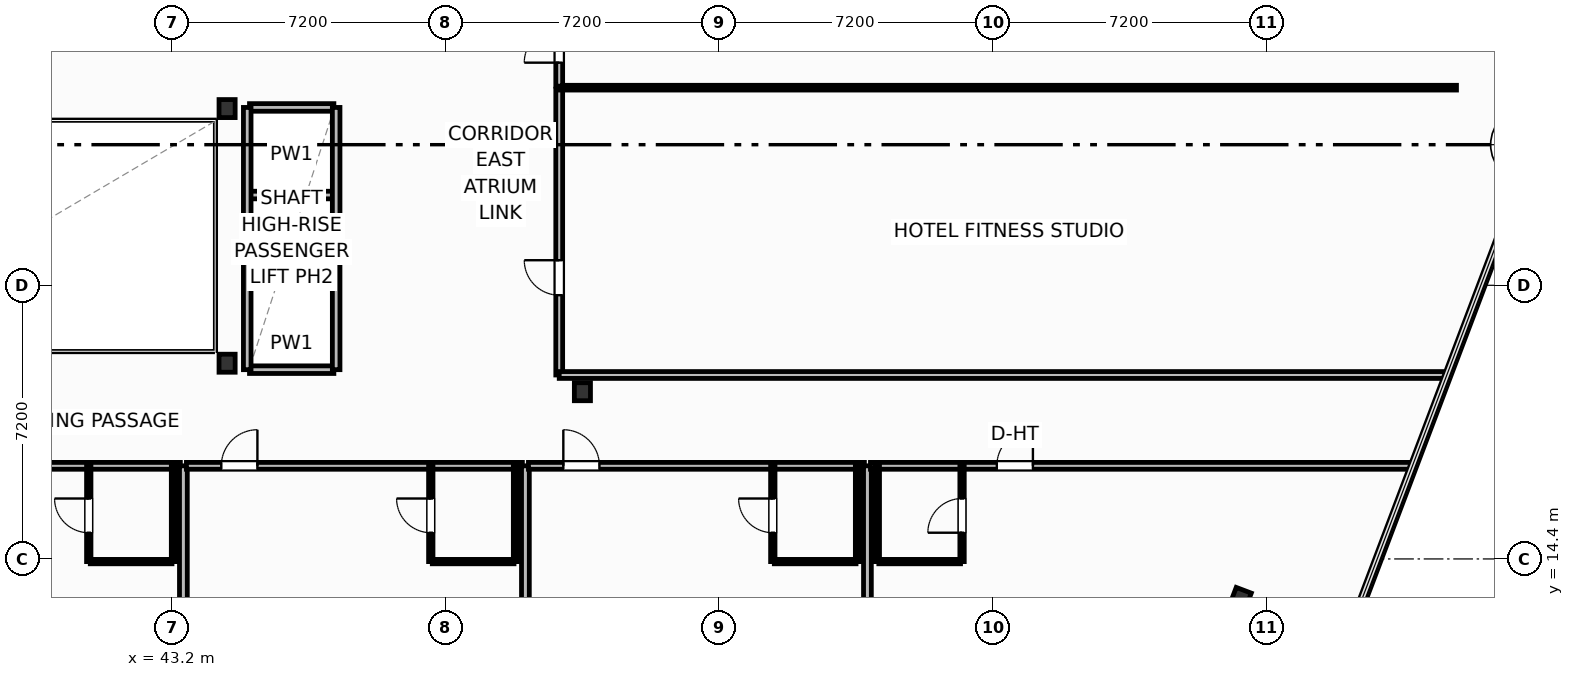
"""IFC4 building model, lengths in metres.
Left out: names, types, materials, properties, quantities, classifications, styles, units other than length and angle.
Written with IfcOpenShell. Run it as: python <this file> out.ifc"""

import sys

from ifc_helpers import new_model, si_unit, direction, frame, frame_2d, origin, origin_2d, place, context, subcontext, project, spatial, rectangle, i_section, extrude, element, fill, save


model = new_model("IFC4")
c1 = context("Model", 3, precision=1e-05, world=origin(), true_north=direction((0.0, 1.0)))
c2 = subcontext(c1, "Body", "Model", "MODEL_VIEW")
j1 = project(units=[si_unit("LENGTHUNIT", "METRE"), si_unit("PLANEANGLEUNIT", "RADIAN")], contexts=[c1])
p1 = place(None, origin())
s1 = spatial("IfcSite", under=j1, at=p1, CompositionType="ELEMENT")
p2 = place(p1, origin())
s2 = spatial("IfcBuilding", under=s1, at=p2, CompositionType="ELEMENT")
p3 = place(p2, frame((0.0, 0.0, 76.2)))
s3 = spatial("IfcBuildingStorey", under=s2, at=p3, CompositionType="ELEMENT", Elevation=76.2)
for number, where, z_axis, x_axis in (
    (1, (44.65, 19.55, 0.0), (0.0, 0.0, 1.0), (1.0, 0.0, 0.0)),
    (2, (44.65, 26.25, 0.0), (0.0, 0.0, 1.0), (1.0, 0.0, 0.0)),
    (3, (54.0, 18.8, 0.0), (0.0, 0.0, 1.0), (1.0, 0.0, 0.0)),
    (4, (71.319, 13.354, 0.0), (0.0, 0.0, 1.0), (0.935, -0.354, 0.0)),
):
    element("IfcColumn", number, at=place(p3, frame(where, z_axis=z_axis, x_axis=x_axis)), inside=s3, PredefinedType="COLUMN", context=c2, shape_type="SweptSolid", body=[
        extrude(i_section(OverallWidth=0.424, OverallDepth=0.474, WebThickness=0.048, FlangeThickness=0.077, FilletRadius=0.025, at=origin_2d()), origin(), (0.0, 0.0, 1.0), 3.7),
    ])
p4 = place(p3, frame((34.58, 16.85, 0.0), z_axis=(0.0, 0.0, 1.0), x_axis=(1.0, 0.0, 0.0)))
e5 = element("IfcWall", 5, at=p4, inside=s3, PredefinedType="PARTITIONING", context=c2, shape_type="SweptSolid", body=[
    extrude(rectangle(XDim=8.84, YDim=0.18, at=frame_2d((4.42, 0.0))), origin(), (0.0, 0.0, 1.0), 3.45),
])
p5 = place(p4, frame((0.918, 0.0, 0.0)))
e6 = element("IfcOpeningElement", 6, at=p5, cuts=e5, PredefinedType="OPENING", context=c2, shape_type="SweptSolid", body=[
    extrude(rectangle(XDim=0.95, YDim=2.15, at=frame_2d((0.475, 1.075))), frame((0.0, 0.1, 0.0), z_axis=(0.0, -1.0, 0.0), x_axis=(1.0, 0.0, 0.0)), (0.0, 0.0, 1.0), 0.2),
])
p6 = place(p3, frame((41.05, 14.33, 0.0), z_axis=(0.0, 0.0, 1.0), x_axis=(1.0, 0.0, 0.0)))
e7 = element("IfcWall", 7, at=p6, inside=s3, PredefinedType="PARTITIONING", context=c2, shape_type="SweptSolid", body=[
    extrude(rectangle(XDim=2.15, YDim=0.115, at=frame_2d((1.075, 0.0))), origin(), (0.0, 0.0, 1.0), 3.45),
])
p7 = place(p3, frame((41.01, 14.33, 0.0), z_axis=(0.0, 0.0, 1.0), x_axis=(0.0, 1.0, 0.0)))
e8 = element("IfcWall", 8, at=p7, inside=s3, PredefinedType="PARTITIONING", context=c2, shape_type="SweptSolid", body=[
    extrude(rectangle(XDim=2.52, YDim=0.115, at=frame_2d((1.26, 0.0))), origin(), (0.0, 0.0, 1.0), 3.45),
])
p8 = place(p7, frame((0.76, 0.0, 0.0)))
e9 = element("IfcOpeningElement", 9, at=p8, cuts=e8, PredefinedType="OPENING", context=c2, shape_type="SweptSolid", body=[
    extrude(rectangle(XDim=0.9, YDim=2.05, at=frame_2d((0.45, 1.025))), frame((0.0, 0.067, 0.0), z_axis=(0.0, -1.0, 0.0), x_axis=(1.0, 0.0, 0.0)), (0.0, 0.0, 1.0), 0.135),
])
p9 = place(p3, frame((43.24, 14.33, 0.0), z_axis=(0.0, 0.0, 1.0), x_axis=(0.0, 1.0, 0.0)))
e10 = element("IfcWall", 10, at=p9, inside=s3, PredefinedType="PARTITIONING", context=c2, shape_type="SweptSolid", body=[
    extrude(rectangle(XDim=2.52, YDim=0.115, at=frame_2d((1.26, 0.0))), origin(), (0.0, 0.0, 1.0), 2.58),
])
p10 = place(p3, frame((43.5, 0.939, 0.0), z_axis=(0.0, 0.0, 1.0), x_axis=(0.0, 1.0, 0.0)))
e11 = element("IfcWall", 11, at=p10, inside=s3, PredefinedType="PARTITIONING", context=c2, shape_type="SweptSolid", body=[
    extrude(rectangle(XDim=15.911, YDim=0.205, at=frame_2d((7.955, 0.0))), origin(), (0.0, 0.0, 1.0), 2.58),
])
p11 = place(p3, frame((43.58, 16.85, 0.0), z_axis=(0.0, 0.0, 1.0), x_axis=(1.0, 0.0, 0.0)))
e12 = element("IfcWall", 12, at=p11, inside=s3, PredefinedType="PARTITIONING", context=c2, shape_type="SweptSolid", body=[
    extrude(rectangle(XDim=8.84, YDim=0.18, at=frame_2d((4.42, 0.0))), origin(), (0.0, 0.0, 1.0), 3.45),
])
p12 = place(p11, frame((0.918, 0.0, 0.0)))
e13 = element("IfcOpeningElement", 13, at=p12, cuts=e12, PredefinedType="OPENING", context=c2, shape_type="SweptSolid", body=[
    extrude(rectangle(XDim=0.95, YDim=2.15, at=frame_2d((0.475, 1.075))), frame((0.0, 0.1, 0.0), z_axis=(0.0, -1.0, 0.0), x_axis=(1.0, 0.0, 0.0)), (0.0, 0.0, 1.0), 0.2),
])
p13 = place(p3, frame((50.05, 14.33, 0.0), z_axis=(0.0, 0.0, 1.0), x_axis=(1.0, 0.0, 0.0)))
e14 = element("IfcWall", 14, at=p13, inside=s3, PredefinedType="PARTITIONING", context=c2, shape_type="SweptSolid", body=[
    extrude(rectangle(XDim=2.15, YDim=0.115, at=frame_2d((1.075, 0.0))), origin(), (0.0, 0.0, 1.0), 3.45),
])
p14 = place(p3, frame((50.01, 14.33, 0.0), z_axis=(0.0, 0.0, 1.0), x_axis=(0.0, 1.0, 0.0)))
e15 = element("IfcWall", 15, at=p14, inside=s3, PredefinedType="PARTITIONING", context=c2, shape_type="SweptSolid", body=[
    extrude(rectangle(XDim=2.52, YDim=0.115, at=frame_2d((1.26, 0.0))), origin(), (0.0, 0.0, 1.0), 3.45),
])
p15 = place(p14, frame((0.76, 0.0, 0.0)))
e16 = element("IfcOpeningElement", 16, at=p15, cuts=e15, PredefinedType="OPENING", context=c2, shape_type="SweptSolid", body=[
    extrude(rectangle(XDim=0.9, YDim=2.05, at=frame_2d((0.45, 1.025))), frame((0.0, 0.067, 0.0), z_axis=(0.0, -1.0, 0.0), x_axis=(1.0, 0.0, 0.0)), (0.0, 0.0, 1.0), 0.135),
])
p16 = place(p3, frame((52.24, 14.33, 0.0), z_axis=(0.0, 0.0, 1.0), x_axis=(0.0, 1.0, 0.0)))
e17 = element("IfcWall", 17, at=p16, inside=s3, PredefinedType="PARTITIONING", context=c2, shape_type="SweptSolid", body=[
    extrude(rectangle(XDim=2.52, YDim=0.115, at=frame_2d((1.26, 0.0))), origin(), (0.0, 0.0, 1.0), 3.45),
])
p17 = place(p3, frame((52.5, -4.63, 0.0), z_axis=(0.0, 0.0, 1.0), x_axis=(0.0, 1.0, 0.0)))
e18 = element("IfcWall", 18, at=p17, inside=s3, PredefinedType="PARTITIONING", context=c2, shape_type="SweptSolid", body=[
    extrude(rectangle(XDim=21.48, YDim=0.205, at=frame_2d((10.74, 0.0))), origin(), (0.0, 0.0, 1.0), 2.58),
])
p18 = place(p3, frame((52.58, 16.85, 0.0), z_axis=(0.0, 0.0, 1.0), x_axis=(1.0, 0.0, 0.0)))
e19 = element("IfcWall", 19, at=p18, inside=s3, PredefinedType="PARTITIONING", context=c2, shape_type="SweptSolid", body=[
    extrude(rectangle(XDim=8.84, YDim=0.18, at=frame_2d((4.42, 0.0))), origin(), (0.0, 0.0, 1.0), 2.58),
])
p19 = place(p18, frame((0.918, 0.0, 0.0)))
e20 = element("IfcOpeningElement", 20, at=p19, cuts=e19, PredefinedType="OPENING", context=c2, shape_type="SweptSolid", body=[
    extrude(rectangle(XDim=0.95, YDim=2.15, at=frame_2d((0.475, 1.075))), frame((0.0, 0.1, 0.0), z_axis=(0.0, -1.0, 0.0), x_axis=(1.0, 0.0, 0.0)), (0.0, 0.0, 1.0), 0.2),
])
p20 = place(p3, frame((59.05, 14.33, 0.0), z_axis=(0.0, 0.0, 1.0), x_axis=(1.0, 0.0, 0.0)))
e21 = element("IfcWall", 21, at=p20, inside=s3, PredefinedType="PARTITIONING", context=c2, shape_type="SweptSolid", body=[
    extrude(rectangle(XDim=2.15, YDim=0.115, at=frame_2d((1.075, 0.0))), origin(), (0.0, 0.0, 1.0), 3.45),
])
p21 = place(p3, frame((59.01, 14.33, 0.0), z_axis=(0.0, 0.0, 1.0), x_axis=(0.0, 1.0, 0.0)))
e22 = element("IfcWall", 22, at=p21, inside=s3, PredefinedType="PARTITIONING", context=c2, shape_type="SweptSolid", body=[
    extrude(rectangle(XDim=2.52, YDim=0.115, at=frame_2d((1.26, 0.0))), origin(), (0.0, 0.0, 1.0), 3.45),
])
p22 = place(p21, frame((0.76, 0.0, 0.0)))
e23 = element("IfcOpeningElement", 23, at=p22, cuts=e22, PredefinedType="OPENING", context=c2, shape_type="SweptSolid", body=[
    extrude(rectangle(XDim=0.9, YDim=2.05, at=frame_2d((0.45, 1.025))), frame((0.0, 0.067, 0.0), z_axis=(0.0, -1.0, 0.0), x_axis=(1.0, 0.0, 0.0)), (0.0, 0.0, 1.0), 0.135),
])
p23 = place(p3, frame((61.24, 14.33, 0.0), z_axis=(0.0, 0.0, 1.0), x_axis=(0.0, 1.0, 0.0)))
e24 = element("IfcWall", 24, at=p23, inside=s3, PredefinedType="PARTITIONING", context=c2, shape_type="SweptSolid", body=[
    extrude(rectangle(XDim=2.52, YDim=0.115, at=frame_2d((1.26, 0.0))), origin(), (0.0, 0.0, 1.0), 3.45),
])
p24 = place(p3, frame((61.5, -4.0, 0.0), z_axis=(0.0, 0.0, 1.0), x_axis=(0.0, 1.0, 0.0)))
e25 = element("IfcWall", 25, at=p24, inside=s3, PredefinedType="PARTITIONING", context=c2, shape_type="SweptSolid", body=[
    extrude(rectangle(XDim=20.85, YDim=0.205, at=frame_2d((10.425, 0.0))), origin(), (0.0, 0.0, 1.0), 3.45),
])
p25 = place(p3, frame((61.58, 16.85, 0.0), z_axis=(0.0, 0.0, 1.0), x_axis=(1.0, 0.0, 0.0)))
e26 = element("IfcWall", 26, at=p25, inside=s3, PredefinedType="PARTITIONING", context=c2, shape_type="SweptSolid", body=[
    extrude(rectangle(XDim=14.222, YDim=0.18, at=frame_2d((7.111, 0.0))), origin(), (0.0, 0.0, 1.0), 3.45),
])
p26 = place(p25, frame((3.325, 0.0, 0.0)))
e27 = element("IfcOpeningElement", 27, at=p26, cuts=e26, PredefinedType="OPENING", context=c2, shape_type="SweptSolid", body=[
    extrude(rectangle(XDim=0.95, YDim=2.15, at=frame_2d((0.475, 1.075))), frame((0.0, 0.1, 0.0), z_axis=(0.0, -1.0, 0.0), x_axis=(1.0, 0.0, 0.0)), (0.0, 0.0, 1.0), 0.2),
])
p27 = place(p3, frame((61.8, 14.33, 0.0), z_axis=(0.0, 0.0, 1.0), x_axis=(1.0, 0.0, 0.0)))
e28 = element("IfcWall", 28, at=p27, inside=s3, PredefinedType="PARTITIONING", context=c2, shape_type="SweptSolid", body=[
    extrude(rectangle(XDim=2.15, YDim=0.115, at=frame_2d((1.075, 0.0))), origin(), (0.0, 0.0, 1.0), 3.45),
])
p28 = place(p3, frame((63.99, 14.33, 0.0), z_axis=(0.0, 0.0, 1.0), x_axis=(0.0, 1.0, 0.0)))
e29 = element("IfcWall", 29, at=p28, inside=s3, PredefinedType="PARTITIONING", context=c2, shape_type="SweptSolid", body=[
    extrude(rectangle(XDim=2.52, YDim=0.115, at=frame_2d((1.26, 0.0))), origin(), (0.0, 0.0, 1.0), 3.45),
])
p29 = place(p28, frame((0.76, 0.0, 0.0)))
e30 = element("IfcOpeningElement", 30, at=p29, cuts=e29, PredefinedType="OPENING", context=c2, shape_type="SweptSolid", body=[
    extrude(rectangle(XDim=0.9, YDim=2.05, at=frame_2d((0.45, 1.025))), frame((0.0, 0.067, 0.0), z_axis=(0.0, -1.0, 0.0), x_axis=(1.0, 0.0, 0.0)), (0.0, 0.0, 1.0), 0.135),
])
p30 = place(p3, frame((61.76, 14.33, 0.0), z_axis=(0.0, 0.0, 1.0), x_axis=(0.0, 1.0, 0.0)))
e31 = element("IfcWall", 31, at=p30, inside=s3, PredefinedType="PARTITIONING", context=c2, shape_type="SweptSolid", body=[
    extrude(rectangle(XDim=2.52, YDim=0.115, at=frame_2d((1.26, 0.0))), origin(), (0.0, 0.0, 1.0), 3.45),
])
p31 = place(p3, frame((53.39, 19.24, 0.0), z_axis=(0.0, 0.0, 1.0), x_axis=(0.0, 1.0, 0.0)))
e32 = element("IfcWall", 32, at=p31, inside=s3, PredefinedType="PARTITIONING", context=c2, shape_type="SweptSolid", body=[
    extrude(rectangle(XDim=7.52, YDim=0.18, at=frame_2d((3.76, 0.0))), origin(), (0.0, 0.0, 1.0), 3.45),
])
p32 = place(p31, frame((2.1, 0.0, 0.0)))
e33 = element("IfcOpeningElement", 33, at=p32, cuts=e32, PredefinedType="OPENING", context=c2, shape_type="SweptSolid", body=[
    extrude(rectangle(XDim=0.92, YDim=2.05, at=frame_2d((0.46, 1.025))), frame((0.0, 0.1, 0.0), z_axis=(0.0, -1.0, 0.0), x_axis=(1.0, 0.0, 0.0)), (0.0, 0.0, 1.0), 0.2),
])
p33 = place(p3, frame((53.39, 26.8, 0.0), z_axis=(0.0, 0.0, 1.0), x_axis=(1.0, 0.0, 0.0)))
e34 = element("IfcWall", 34, at=p33, inside=s3, PredefinedType="PARTITIONING", context=c2, shape_type="SweptSolid", body=[
    extrude(rectangle(XDim=23.61, YDim=0.125, at=frame_2d((11.805, 0.0))), origin(), (0.0, 0.0, 1.0), 3.45),
])
p34 = place(p3, frame((53.39, 19.24, 0.0), z_axis=(0.0, 0.0, 1.0), x_axis=(1.0, 0.0, 0.0)))
e35 = element("IfcWall", 35, at=p34, inside=s3, PredefinedType="PARTITIONING", context=c2, shape_type="SweptSolid", body=[
    extrude(rectangle(XDim=23.317, YDim=0.18, at=frame_2d((11.658, 0.0))), origin(), (0.0, 0.0, 1.0), 3.45),
])
p35 = place(p3, frame((53.39, 26.84, 0.0), z_axis=(0.0, 0.0, 1.0), x_axis=(0.0, 1.0, 0.0)))
e36 = element("IfcWall", 36, at=p35, inside=s3, PredefinedType="PARTITIONING", context=c2, shape_type="SweptSolid", body=[
    extrude(rectangle(XDim=12.46, YDim=0.18, at=frame_2d((6.23, 0.0))), origin(), (0.0, 0.0, 1.0), 3.45),
])
p36 = place(p35, frame((0.618, 0.0, 0.0)))
e37 = element("IfcOpeningElement", 37, at=p36, cuts=e36, PredefinedType="OPENING", context=c2, shape_type="SweptSolid", body=[
    extrude(rectangle(XDim=0.92, YDim=2.05, at=frame_2d((0.46, 1.025))), frame((0.0, 0.1, 0.0), z_axis=(0.0, -1.0, 0.0), x_axis=(1.0, 0.0, 0.0)), (0.0, 0.0, 1.0), 0.2),
])
for number, where, z_axis, x_axis in (
    (38, (45.24, 21.675, 0.0), (0.0, 0.0, 1.0), (1.0, 0.0, 0.0)),
    (39, (45.24, 23.975, 0.0), (0.0, 0.0, 1.0), (1.0, 0.0, 0.0)),
):
    element("IfcWall", number, at=place(p3, frame(where, z_axis=z_axis, x_axis=x_axis)), inside=s3, PredefinedType="PARTITIONING", context=c2, shape_type="SweptSolid", body=[
        extrude(rectangle(XDim=2.22, YDim=0.2, at=frame_2d((1.11, 0.0))), origin(), (0.0, 0.0, 1.0), 3.45),
    ])
p37 = place(p3, frame((45.24, 19.38, 0.0), z_axis=(0.0, 0.0, 1.0), x_axis=(1.0, 0.0, 0.0)))
e40 = element("IfcWall", 40, at=p37, inside=s3, PredefinedType="PARTITIONING", context=c2, shape_type="SweptSolid", body=[
    extrude(rectangle(XDim=2.22, YDim=0.2, at=frame_2d((1.11, 0.0))), origin(), (0.0, 0.0, 1.0), 2.662),
])
p38 = place(p3, frame((45.24, 26.28, 0.0), z_axis=(0.0, 0.0, 1.0), x_axis=(1.0, 0.0, 0.0)))
e41 = element("IfcWall", 41, at=p38, inside=s3, PredefinedType="PARTITIONING", context=c2, shape_type="SweptSolid", body=[
    extrude(rectangle(XDim=2.22, YDim=0.2, at=frame_2d((1.11, 0.0))), origin(), (0.0, 0.0, 1.0), 3.45),
])
for number, where, z_axis, x_axis in (
    (42, (45.18, 19.38, 0.0), (0.0, 0.0, 1.0), (0.0, 1.0, 0.0)),
    (43, (47.52, 19.38, 0.0), (0.0, 0.0, 1.0), (0.0, 1.0, 0.0)),
):
    element("IfcWall", number, at=place(p3, frame(where, z_axis=z_axis, x_axis=x_axis)), inside=s3, PredefinedType="PARTITIONING", context=c2, shape_type="SweptSolid", body=[
        extrude(rectangle(XDim=6.9, YDim=0.2, at=frame_2d((3.45, 0.0))), origin(), (0.0, 0.0, 1.0), 3.45),
    ])
p39 = place(p8, origin())
e44 = element("IfcDoor", 44, at=p39, inside=s3, OperationType="SINGLE_SWING_RIGHT", PredefinedType="DOOR", context=c2, shape_type="SweptSolid", body=[
    extrude(rectangle(XDim=0.9, YDim=2.05, at=frame_2d((0.45, 1.025))), frame((0.0, 0.025, 0.0), z_axis=(0.0, -1.0, 0.0), x_axis=(1.0, 0.0, 0.0)), (0.0, 0.0, 1.0), 0.05),
])
fill(e9, e44)
p40 = place(p12, origin())
e45 = element("IfcDoor", 45, at=p40, inside=s3, OperationType="SINGLE_SWING_RIGHT", PredefinedType="DOOR", context=c2, shape_type="SweptSolid", body=[
    extrude(rectangle(XDim=0.95, YDim=2.15, at=frame_2d((0.475, 1.075))), frame((0.0, 0.025, 0.0), z_axis=(0.0, -1.0, 0.0), x_axis=(1.0, 0.0, 0.0)), (0.0, 0.0, 1.0), 0.05),
])
fill(e13, e45)
p41 = place(p15, origin())
e46 = element("IfcDoor", 46, at=p41, inside=s3, OperationType="SINGLE_SWING_RIGHT", PredefinedType="DOOR", context=c2, shape_type="SweptSolid", body=[
    extrude(rectangle(XDim=0.9, YDim=2.05, at=frame_2d((0.45, 1.025))), frame((0.0, 0.025, 0.0), z_axis=(0.0, -1.0, 0.0), x_axis=(1.0, 0.0, 0.0)), (0.0, 0.0, 1.0), 0.05),
])
fill(e16, e46)
p42 = place(p19, origin())
e47 = element("IfcDoor", 47, at=p42, inside=s3, OperationType="SINGLE_SWING_LEFT", PredefinedType="DOOR", context=c2, shape_type="SweptSolid", body=[
    extrude(rectangle(XDim=0.95, YDim=2.15, at=frame_2d((0.475, 1.075))), frame((0.0, 0.025, 0.0), z_axis=(0.0, -1.0, 0.0), x_axis=(1.0, 0.0, 0.0)), (0.0, 0.0, 1.0), 0.05),
])
fill(e20, e47)
p43 = place(p22, origin())
e48 = element("IfcDoor", 48, at=p43, inside=s3, OperationType="SINGLE_SWING_RIGHT", PredefinedType="DOOR", context=c2, shape_type="SweptSolid", body=[
    extrude(rectangle(XDim=0.9, YDim=2.05, at=frame_2d((0.45, 1.025))), frame((0.0, 0.025, 0.0), z_axis=(0.0, -1.0, 0.0), x_axis=(1.0, 0.0, 0.0)), (0.0, 0.0, 1.0), 0.05),
])
fill(e23, e48)
p44 = place(p26, origin())
e49 = element("IfcDoor", 49, at=p44, inside=s3, OperationType="SINGLE_SWING_RIGHT", PredefinedType="DOOR", context=c2, shape_type="SweptSolid", body=[
    extrude(rectangle(XDim=0.95, YDim=2.15, at=frame_2d((0.475, 1.075))), frame((0.0, 0.025, 0.0), z_axis=(0.0, -1.0, 0.0), x_axis=(1.0, 0.0, 0.0)), (0.0, 0.0, 1.0), 0.05),
])
fill(e27, e49)
p45 = place(p29, origin())
e50 = element("IfcDoor", 50, at=p45, inside=s3, OperationType="SINGLE_SWING_LEFT", PredefinedType="DOOR", context=c2, shape_type="SweptSolid", body=[
    extrude(rectangle(XDim=0.9, YDim=2.05, at=frame_2d((0.45, 1.025))), frame((0.0, 0.025, 0.0), z_axis=(0.0, -1.0, 0.0), x_axis=(1.0, 0.0, 0.0)), (0.0, 0.0, 1.0), 0.05),
])
fill(e30, e50)
p46 = place(p32, origin())
e51 = element("IfcDoor", 51, at=p46, inside=s3, OperationType="SINGLE_SWING_RIGHT", PredefinedType="DOOR", context=c2, shape_type="SweptSolid", body=[
    extrude(rectangle(XDim=0.92, YDim=2.05, at=frame_2d((0.46, 1.025))), frame((0.0, 0.025, 0.0), z_axis=(0.0, -1.0, 0.0), x_axis=(1.0, 0.0, 0.0)), (0.0, 0.0, 1.0), 0.05),
])
fill(e33, e51)
p47 = place(p36, origin())
e52 = element("IfcDoor", 52, at=p47, inside=s3, OperationType="SINGLE_SWING_LEFT", PredefinedType="DOOR", context=c2, shape_type="SweptSolid", body=[
    extrude(rectangle(XDim=0.92, YDim=2.05, at=frame_2d((0.46, 1.025))), frame((0.0, 0.025, 0.0), z_axis=(0.0, -1.0, 0.0), x_axis=(1.0, 0.0, 0.0)), (0.0, 0.0, 1.0), 0.05),
])
fill(e37, e52)
save(model, sys.argv[1])
